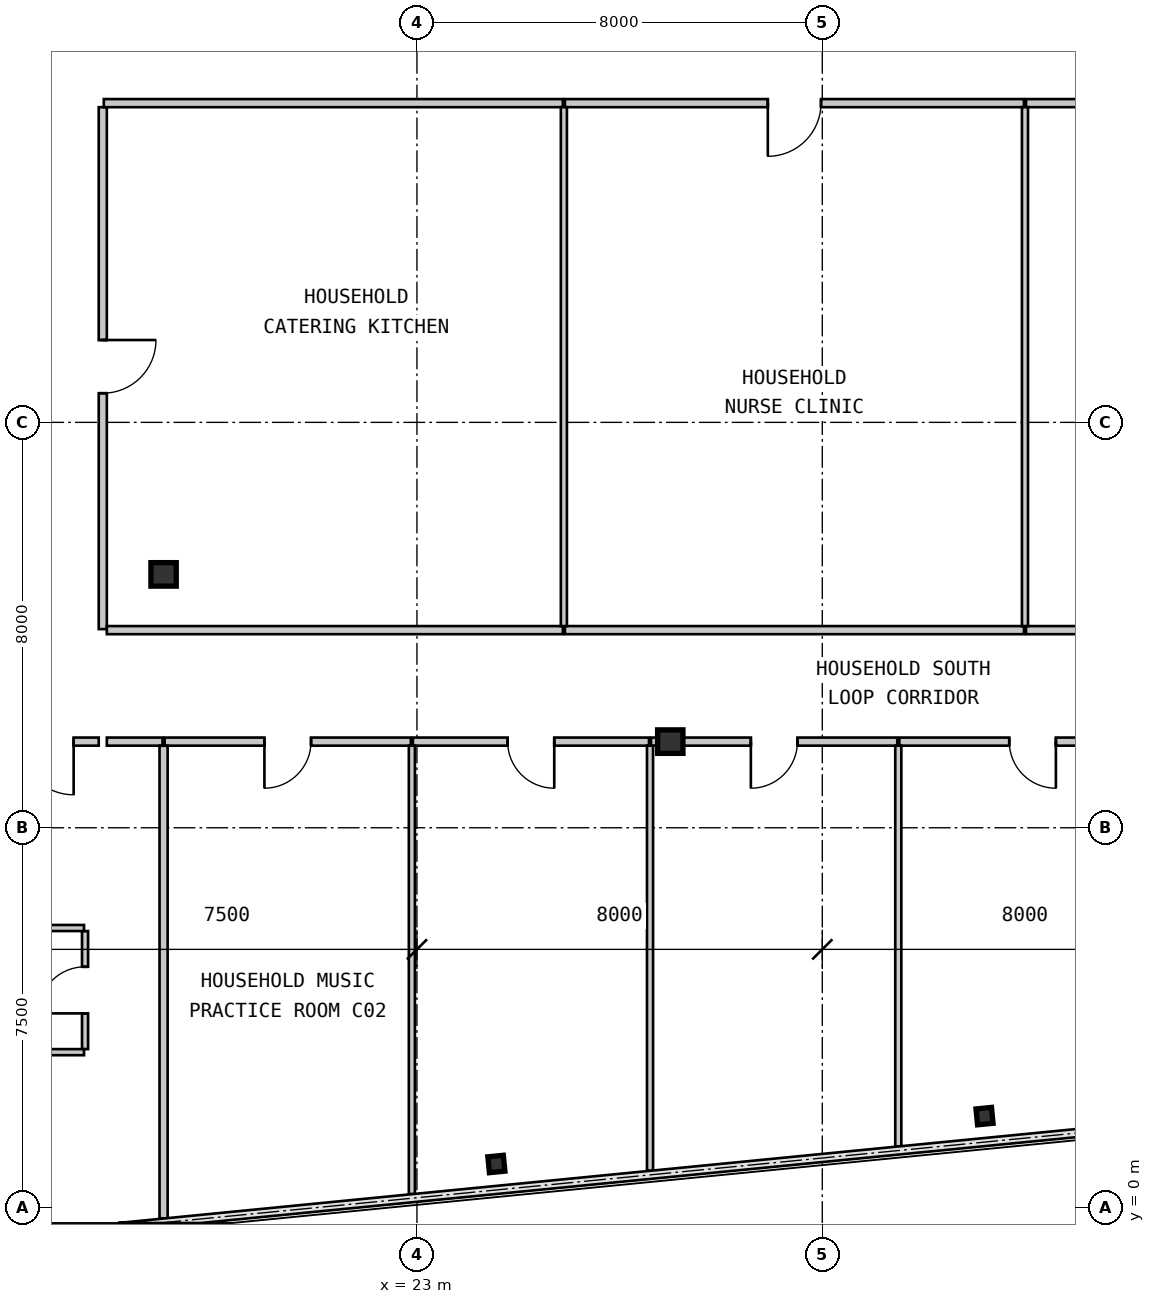
"""IFC4 building model, lengths in metres.
Left out: names, types, materials, properties, quantities, classifications, styles, units other than length and angle.
Written with IfcOpenShell. Run it as: python <this file> out.ifc"""

import sys

from ifc_helpers import new_model, si_unit, direction, frame, frame_2d, origin, origin_2d, place, context, subcontext, project, spatial, rectangle, i_section, extrude, source, transform, mapped, element, fill, save


model = new_model("IFC4")
c1 = context("Model", 3, precision=1e-05, world=origin(), true_north=direction((0.0, 1.0)))
c2 = subcontext(c1, "Body", "Model", "MODEL_VIEW")
j1 = project(units=[si_unit("LENGTHUNIT", "METRE"), si_unit("PLANEANGLEUNIT", "RADIAN")], contexts=[c1])
p1 = place(None, origin())
s1 = spatial("IfcSite", under=j1, at=p1, CompositionType="ELEMENT")
p2 = place(p1, origin())
s2 = spatial("IfcBuilding", under=s1, at=p2, CompositionType="ELEMENT")
p3 = place(p2, frame((0.0, 0.0, 68.25)))
s3 = spatial("IfcBuildingStorey", under=s2, at=p3, CompositionType="ELEMENT", Elevation=68.25)
m1 = source(origin(), c2, "Body", "SweptSolid", [
    extrude(i_section(OverallWidth=0.5, OverallDepth=0.464, WebThickness=0.022, FlangeThickness=0.034, at=origin_2d()), origin(), (0.0, 0.0, 1.0), 3.15),
])
for number, where, z_axis, x_axis in (
    (1, (28.0, 9.2, 0.0), (0.0, 0.0, 1.0), (1.0, 0.0, 0.0)),
    (2, (18.0, 12.5, 0.0), (0.0, 0.0, 1.0), (1.0, 0.0, 0.0)),
):
    element("IfcColumn", number, at=place(p3, frame(where, z_axis=z_axis, x_axis=x_axis)), inside=s3, PredefinedType="COLUMN", context=c2, shape_type="MappedRepresentation", body=[
        mapped(m1, transform((0.0, 0.0, 0.0), scale=1.0)),
    ])
m2 = source(origin(), c2, "Body", "SweptSolid", [
    extrude(i_section(OverallWidth=0.307, OverallDepth=0.315, WebThickness=0.012, FlangeThickness=0.019, at=origin_2d()), origin(), (0.0, 0.0, 1.0), 3.15),
])
for number, where, z_axis, x_axis in (
    (3, (24.568, 0.865, 0.0), (0.0, 0.0, 1.0), (0.995, 0.098, 0.0)),
    (4, (34.202, 1.809, 0.0), (0.0, 0.0, 1.0), (0.995, 0.098, 0.0)),
):
    element("IfcColumn", number, at=place(p3, frame(where, z_axis=z_axis, x_axis=x_axis)), inside=s3, PredefinedType="COLUMN", context=c2, shape_type="MappedRepresentation", body=[
        mapped(m2, transform((0.0, 0.0, 0.0), scale=1.0)),
    ])
m3 = source(origin(), c2, "Body", "SweptSolid", [
    extrude(rectangle(XDim=10.3, YDim=0.16, at=frame_2d((5.15, 0.0))), origin(), (0.0, 0.0, 1.0), 2.93),
])
p4 = place(p3, frame((16.8, 21.72, 0.0), z_axis=(0.0, 0.0, 1.0), x_axis=(0.0, -1.0, 0.0)))
e5 = element("IfcWall", 5, at=p4, inside=s3, PredefinedType="PARTITIONING", context=c2, shape_type="MappedRepresentation", body=[
    mapped(m3, transform((0.0, 0.0, 0.0), scale=1.0)),
])
m4 = source(origin(), c2, "Body", "SweptSolid", [
    extrude(rectangle(XDim=1.05, YDim=2.1, at=frame_2d((0.525, 1.05))), frame((0.0, 0.09, 0.0), z_axis=(0.0, -1.0, 0.0), x_axis=(1.0, 0.0, 0.0)), (0.0, 0.0, 1.0), 0.18),
])
p5 = place(p4, frame((4.595, 0.0, 0.0)))
e6 = element("IfcOpeningElement", 6, at=p5, cuts=e5, PredefinedType="OPENING", context=c2, shape_type="MappedRepresentation", body=[
    mapped(m4, transform((0.0, 0.0, 0.0), scale=1.0)),
])
m5 = source(origin(), c2, "Body", "SweptSolid", [
    extrude(rectangle(XDim=9.06, YDim=0.16, at=frame_2d((4.53, 0.0))), origin(), (0.0, 0.0, 1.0), 2.93),
])
p6 = place(p3, frame((25.88, 21.8, 0.0), z_axis=(0.0, 0.0, 1.0), x_axis=(-1.0, 0.0, 0.0)))
e7 = element("IfcWall", 7, at=p6, inside=s3, PredefinedType="PARTITIONING", context=c2, shape_type="MappedRepresentation", body=[
    mapped(m5, transform((0.0, 0.0, 0.0), scale=1.0)),
])
p7 = place(p3, frame((34.98, 21.8, 0.0), z_axis=(0.0, 0.0, 1.0), x_axis=(-1.0, 0.0, 0.0)))
e8 = element("IfcWall", 8, at=p7, inside=s3, PredefinedType="PARTITIONING", context=c2, shape_type="MappedRepresentation", body=[
    mapped(m5, transform((0.0, 0.0, 0.0), scale=1.0)),
])
p8 = place(p7, frame((4.005, 0.0, 0.0)))
e9 = element("IfcOpeningElement", 9, at=p8, cuts=e8, PredefinedType="OPENING", context=c2, shape_type="MappedRepresentation", body=[
    mapped(m4, transform((0.0, 0.0, 0.0), scale=1.0)),
])
p9 = place(p3, frame((44.08, 21.8, 0.0), z_axis=(0.0, 0.0, 1.0), x_axis=(-1.0, 0.0, 0.0)))
e10 = element("IfcWall", 10, at=p9, inside=s3, PredefinedType="PARTITIONING", context=c2, shape_type="MappedRepresentation", body=[
    mapped(m5, transform((0.0, 0.0, 0.0), scale=1.0)),
])
p10 = place(p9, frame((4.005, 0.0, 0.0)))
e11 = element("IfcOpeningElement", 11, at=p10, cuts=e10, PredefinedType="OPENING", context=c2, shape_type="MappedRepresentation", body=[
    mapped(m4, transform((0.0, 0.0, 0.0), scale=1.0)),
])
m6 = source(origin(), c2, "Body", "SweptSolid", [
    extrude(rectangle(XDim=2.04, YDim=0.16, at=frame_2d((1.02, 0.0))), origin(), (0.0, 0.0, 1.0), 2.93),
])
p11 = place(p3, frame((16.72, 9.2, 0.0), z_axis=(0.0, 0.0, 1.0), x_axis=(-1.0, 0.0, 0.0)))
e12 = element("IfcWall", 12, at=p11, inside=s3, PredefinedType="PARTITIONING", context=c2, shape_type="MappedRepresentation", body=[
    mapped(m6, transform((0.0, 0.0, 0.0), scale=1.0)),
])
p12 = place(p11, frame((0.495, 0.0, 0.0)))
e13 = element("IfcOpeningElement", 13, at=p12, cuts=e12, PredefinedType="OPENING", context=c2, shape_type="MappedRepresentation", body=[
    mapped(m4, transform((0.0, 0.0, 0.0), scale=1.0)),
])
m7 = source(origin(), c2, "Body", "SweptSolid", [
    extrude(rectangle(XDim=9.0, YDim=0.16, at=frame_2d((4.5, 0.0))), origin(), (0.0, 0.0, 1.0), 2.93),
])
p13 = place(p3, frame((16.88, 11.4, 0.0), z_axis=(0.0, 0.0, 1.0), x_axis=(1.0, 0.0, 0.0)))
e14 = element("IfcWall", 14, at=p13, inside=s3, PredefinedType="PARTITIONING", context=c2, shape_type="MappedRepresentation", body=[
    mapped(m7, transform((0.0, 0.0, 0.0), scale=1.0)),
])
for number, where, z_axis, x_axis in (
    (15, (25.92, 11.4, 0.0), (0.0, 0.0, 1.0), (1.0, 0.0, 0.0)),
    (16, (35.02, 11.4, 0.0), (0.0, 0.0, 1.0), (1.0, 0.0, 0.0)),
):
    element("IfcWall", number, at=place(p3, frame(where, z_axis=z_axis, x_axis=x_axis)), inside=s3, PredefinedType="PARTITIONING", context=c2, shape_type="MappedRepresentation", body=[
        mapped(m5, transform((0.0, 0.0, 0.0), scale=1.0)),
    ])
m8 = source(origin(), c2, "Body", "SweptSolid", [
    extrude(rectangle(XDim=1.1, YDim=0.16, at=frame_2d((0.55, 0.0))), origin(), (0.0, 0.0, 1.0), 2.93),
])
p14 = place(p3, frame((17.98, 9.2, 0.0), z_axis=(0.0, 0.0, 1.0), x_axis=(-1.0, 0.0, 0.0)))
e17 = element("IfcWall", 17, at=p14, inside=s3, PredefinedType="PARTITIONING", context=c2, shape_type="MappedRepresentation", body=[
    mapped(m8, transform((0.0, 0.0, 0.0), scale=1.0)),
])
m9 = source(origin(), c2, "Body", "SweptSolid", [
    extrude(rectangle(XDim=4.86, YDim=0.16, at=frame_2d((2.43, 0.0))), origin(), (0.0, 0.0, 1.0), 2.93),
])
p15 = place(p3, frame((22.88, 9.2, 0.0), z_axis=(0.0, 0.0, 1.0), x_axis=(-1.0, 0.0, 0.0)))
e18 = element("IfcWall", 18, at=p15, inside=s3, PredefinedType="PARTITIONING", context=c2, shape_type="MappedRepresentation", body=[
    mapped(m9, transform((0.0, 0.0, 0.0), scale=1.0)),
])
m10 = source(origin(), c2, "Body", "SweptSolid", [
    extrude(rectangle(XDim=0.92, YDim=2.1, at=frame_2d((0.46, 1.05))), frame((0.0, 0.09, 0.0), z_axis=(0.0, -1.0, 0.0), x_axis=(1.0, 0.0, 0.0)), (0.0, 0.0, 1.0), 0.18),
])
p16 = place(p15, frame((1.97, 0.0, 0.0)))
e19 = element("IfcOpeningElement", 19, at=p16, cuts=e18, PredefinedType="OPENING", context=c2, shape_type="MappedRepresentation", body=[
    mapped(m10, transform((0.0, 0.0, 0.0), scale=1.0)),
])
m11 = source(origin(), c2, "Body", "SweptSolid", [
    extrude(rectangle(XDim=4.66, YDim=0.16, at=frame_2d((2.33, 0.0))), origin(), (0.0, 0.0, 1.0), 2.93),
])
p17 = place(p3, frame((27.58, 9.2, 0.0), z_axis=(0.0, 0.0, 1.0), x_axis=(-1.0, 0.0, 0.0)))
e20 = element("IfcWall", 20, at=p17, inside=s3, PredefinedType="PARTITIONING", context=c2, shape_type="MappedRepresentation", body=[
    mapped(m11, transform((0.0, 0.0, 0.0), scale=1.0)),
])
p18 = place(p17, frame((1.87, 0.0, 0.0)))
e21 = element("IfcOpeningElement", 21, at=p18, cuts=e20, PredefinedType="OPENING", context=c2, shape_type="MappedRepresentation", body=[
    mapped(m10, transform((0.0, 0.0, 0.0), scale=1.0)),
])
m12 = source(origin(), c2, "Body", "SweptSolid", [
    extrude(rectangle(XDim=4.48, YDim=0.16, at=frame_2d((2.24, 0.0))), origin(), (0.0, 0.0, 1.0), 2.328),
])
p19 = place(p3, frame((32.48, 9.2, 0.0), z_axis=(0.0, 0.0, 1.0), x_axis=(-1.0, 0.0, 0.0)))
e22 = element("IfcWall", 22, at=p19, inside=s3, PredefinedType="PARTITIONING", context=c2, shape_type="MappedRepresentation", body=[
    mapped(m12, transform((0.0, 0.0, 0.0), scale=1.0)),
])
p20 = place(p19, frame((1.97, 0.0, 0.0)))
e23 = element("IfcOpeningElement", 23, at=p20, cuts=e22, PredefinedType="OPENING", context=c2, shape_type="MappedRepresentation", body=[
    mapped(m10, transform((0.0, 0.0, 0.0), scale=1.0)),
])
m13 = source(origin(), c2, "Body", "SweptSolid", [
    extrude(rectangle(XDim=0.38, YDim=0.16, at=frame_2d((0.19, 0.0))), origin(), (0.0, 0.0, 1.0), 2.93),
])
p21 = place(p3, frame((28.0, 9.2, 0.0), z_axis=(0.0, 0.0, 1.0), x_axis=(-1.0, 0.0, 0.0)))
e24 = element("IfcWall", 24, at=p21, inside=s3, PredefinedType="PARTITIONING", context=c2, shape_type="MappedRepresentation", body=[
    mapped(m13, transform((0.0, 0.0, 0.0), scale=1.0)),
])
m14 = source(origin(), c2, "Body", "SweptSolid", [
    extrude(rectangle(XDim=5.26, YDim=0.16, at=frame_2d((2.63, 0.0))), origin(), (0.0, 0.0, 1.0), 2.328),
])
p22 = place(p3, frame((37.78, 9.2, 0.0), z_axis=(0.0, 0.0, 1.0), x_axis=(-1.0, 0.0, 0.0)))
e25 = element("IfcWall", 25, at=p22, inside=s3, PredefinedType="PARTITIONING", context=c2, shape_type="MappedRepresentation", body=[
    mapped(m14, transform((0.0, 0.0, 0.0), scale=1.0)),
])
p23 = place(p22, frame((2.17, 0.0, 0.0)))
e26 = element("IfcOpeningElement", 26, at=p23, cuts=e25, PredefinedType="OPENING", context=c2, shape_type="MappedRepresentation", body=[
    mapped(m10, transform((0.0, 0.0, 0.0), scale=1.0)),
])
m15 = source(origin(), c2, "Body", "SweptSolid", [
    extrude(rectangle(XDim=10.24, YDim=0.12, at=frame_2d((5.12, 0.0))), origin(), (0.0, 0.0, 1.0), 2.93),
])
for number, where, z_axis, x_axis in (
    (27, (25.9, 21.72, 0.0), (0.0, 0.0, 1.0), (0.0, -1.0, 0.0)),
    (28, (35.0, 21.72, 0.0), (0.0, 0.0, 1.0), (0.0, -1.0, 0.0)),
):
    element("IfcWall", number, at=place(p3, frame(where, z_axis=z_axis, x_axis=x_axis)), inside=s3, PredefinedType="PARTITIONING", context=c2, shape_type="MappedRepresentation", body=[
        mapped(m15, transform((0.0, 0.0, 0.0), scale=1.0)),
    ])
m16 = source(origin(), c2, "Body", "SweptSolid", [
    extrude(rectangle(XDim=2.33, YDim=0.12, at=frame_2d((1.165, 0.0))), origin(), (0.0, 0.0, 1.0), 2.93),
])
p24 = place(p3, frame((16.45, 3.132, 0.0), z_axis=(0.0, 0.0, 1.0), x_axis=(0.0, 1.0, 0.0)))
e29 = element("IfcWall", 29, at=p24, inside=s3, PredefinedType="PARTITIONING", context=c2, shape_type="MappedRepresentation", body=[
    mapped(m16, transform((0.0, 0.0, 0.0), scale=1.0)),
])
m17 = source(origin(), c2, "Body", "SweptSolid", [
    extrude(rectangle(XDim=0.92, YDim=2.1, at=frame_2d((0.46, 1.05))), frame((0.0, 0.07, 0.0), z_axis=(0.0, -1.0, 0.0), x_axis=(1.0, 0.0, 0.0)), (0.0, 0.0, 1.0), 0.14),
])
p25 = place(p24, frame((0.705, 0.0, 0.0)))
e30 = element("IfcOpeningElement", 30, at=p25, cuts=e29, PredefinedType="OPENING", context=c2, shape_type="MappedRepresentation", body=[
    mapped(m17, transform((0.0, 0.0, 0.0), scale=1.0)),
])
m18 = source(origin(), c2, "Body", "SweptSolid", [
    extrude(rectangle(XDim=1.75, YDim=0.12, at=frame_2d((0.875, 0.0))), origin(), (0.0, 0.0, 1.0), 2.93),
])
for number, where, z_axis, x_axis in (
    (31, (14.68, 3.072, 0.0), (0.0, 0.0, 1.0), (1.0, 0.0, 0.0)),
    (32, (16.43, 5.521, 0.0), (0.0, 0.0, 1.0), (-1.0, 0.0, 0.0)),
):
    element("IfcWall", number, at=place(p3, frame(where, z_axis=z_axis, x_axis=x_axis)), inside=s3, PredefinedType="PARTITIONING", context=c2, shape_type="MappedRepresentation", body=[
        mapped(m18, transform((0.0, 0.0, 0.0), scale=1.0)),
    ])
m19 = source(origin(), c2, "Body", "SweptSolid", [
    extrude(rectangle(XDim=9.325, YDim=0.16, at=frame_2d((4.663, 0.0))), origin(), (0.0, 0.0, 1.0), 2.93),
])
p26 = place(p3, frame((18.0, 9.118, 0.0), z_axis=(0.0, 0.0, 1.0), x_axis=(0.0, -1.0, 0.0)))
e33 = element("IfcWall", 33, at=p26, inside=s3, PredefinedType="PARTITIONING", context=c2, shape_type="MappedRepresentation", body=[
    mapped(m19, transform((0.0, 0.0, 0.0), scale=1.0)),
])
m20 = source(origin(), c2, "Body", "SweptSolid", [
    extrude(rectangle(XDim=8.849, YDim=0.12, at=frame_2d((4.424, 0.0))), origin(), (0.0, 0.0, 1.0), 2.93),
])
p27 = place(p3, frame((22.9, 9.12, 0.0), z_axis=(0.0, 0.0, 1.0), x_axis=(0.0, -1.0, 0.0)))
e34 = element("IfcWall", 34, at=p27, inside=s3, PredefinedType="PARTITIONING", context=c2, shape_type="MappedRepresentation", body=[
    mapped(m20, transform((0.0, 0.0, 0.0), scale=1.0)),
])
m21 = source(origin(), c2, "Body", "SweptSolid", [
    extrude(rectangle(XDim=8.388, YDim=0.12, at=frame_2d((4.194, 0.0))), origin(), (0.0, 0.0, 1.0), 2.93),
])
p28 = place(p3, frame((27.6, 9.12, 0.0), z_axis=(0.0, 0.0, 1.0), x_axis=(0.0, -1.0, 0.0)))
e35 = element("IfcWall", 35, at=p28, inside=s3, PredefinedType="PARTITIONING", context=c2, shape_type="MappedRepresentation", body=[
    mapped(m21, transform((0.0, 0.0, 0.0), scale=1.0)),
])
m22 = source(origin(), c2, "Body", "SweptSolid", [
    extrude(rectangle(XDim=7.907, YDim=0.12, at=frame_2d((3.954, 0.0))), origin(), (0.0, 0.0, 1.0), 2.93),
])
p29 = place(p3, frame((32.5, 9.12, 0.0), z_axis=(0.0, 0.0, 1.0), x_axis=(0.0, -1.0, 0.0)))
e36 = element("IfcWall", 36, at=p29, inside=s3, PredefinedType="PARTITIONING", context=c2, shape_type="MappedRepresentation", body=[
    mapped(m22, transform((0.0, 0.0, 0.0), scale=1.0)),
])
m23 = source(origin(), c2, "Body", "SweptSolid", [
    extrude(rectangle(XDim=1.05, YDim=2.1, at=frame_2d((0.525, 1.05))), frame((0.0, 0.025, 0.0), z_axis=(0.0, -1.0, 0.0), x_axis=(1.0, 0.0, 0.0)), (0.0, 0.0, 1.0), 0.05),
])
p30 = place(p5, origin())
e37 = element("IfcDoor", 37, at=p30, inside=s3, OperationType="SINGLE_SWING_LEFT", PredefinedType="DOOR", context=c2, shape_type="MappedRepresentation", body=[
    mapped(m23, transform((0.0, 0.0, 0.0), scale=1.0)),
])
fill(e6, e37)
p31 = place(p8, origin())
e38 = element("IfcDoor", 38, at=p31, inside=s3, OperationType="SINGLE_SWING_RIGHT", PredefinedType="DOOR", context=c2, shape_type="MappedRepresentation", body=[
    mapped(m23, transform((0.0, 0.0, 0.0), scale=1.0)),
])
fill(e9, e38)
p32 = place(p12, origin())
e39 = element("IfcDoor", 39, at=p32, inside=s3, OperationType="SINGLE_SWING_LEFT", PredefinedType="DOOR", context=c2, shape_type="MappedRepresentation", body=[
    mapped(m23, transform((0.0, 0.0, 0.0), scale=1.0)),
])
fill(e13, e39)
m24 = source(origin(), c2, "Body", "SweptSolid", [
    extrude(rectangle(XDim=0.92, YDim=2.1, at=frame_2d((0.46, 1.05))), frame((0.0, 0.025, 0.0), z_axis=(0.0, -1.0, 0.0), x_axis=(1.0, 0.0, 0.0)), (0.0, 0.0, 1.0), 0.05),
])
p33 = place(p16, origin())
e40 = element("IfcDoor", 40, at=p33, inside=s3, OperationType="SINGLE_SWING_RIGHT", PredefinedType="DOOR", context=c2, shape_type="MappedRepresentation", body=[
    mapped(m24, transform((0.0, 0.0, 0.0), scale=1.0)),
])
fill(e19, e40)
p34 = place(p18, origin())
e41 = element("IfcDoor", 41, at=p34, inside=s3, OperationType="SINGLE_SWING_LEFT", PredefinedType="DOOR", context=c2, shape_type="MappedRepresentation", body=[
    mapped(m24, transform((0.0, 0.0, 0.0), scale=1.0)),
])
fill(e21, e41)
p35 = place(p20, origin())
e42 = element("IfcDoor", 42, at=p35, inside=s3, OperationType="SINGLE_SWING_RIGHT", PredefinedType="DOOR", context=c2, shape_type="MappedRepresentation", body=[
    mapped(m24, transform((0.0, 0.0, 0.0), scale=1.0)),
])
fill(e23, e42)
p36 = place(p23, origin())
e43 = element("IfcDoor", 43, at=p36, inside=s3, OperationType="SINGLE_SWING_LEFT", PredefinedType="DOOR", context=c2, shape_type="MappedRepresentation", body=[
    mapped(m24, transform((0.0, 0.0, 0.0), scale=1.0)),
])
fill(e26, e43)
p37 = place(p25, origin())
e44 = element("IfcDoor", 44, at=p37, inside=s3, OperationType="SINGLE_SWING_LEFT", PredefinedType="DOOR", context=c2, shape_type="MappedRepresentation", body=[
    mapped(m24, transform((0.0, 0.0, 0.0), scale=1.0)),
])
fill(e30, e44)
save(model, sys.argv[1])
